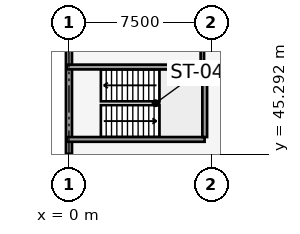
"""IFC4 building model, lengths in metres.
Left out: names, types, materials, properties, quantities, classifications, styles, units other than length and angle.
Written with IfcOpenShell. Run it as: python <this file> out.ifc"""

import sys

from ifc_helpers import new_model, si_unit, direction, frame, frame_2d, origin, place, context, subcontext, project, spatial, rectangle, extrude, element, fill, save


model = new_model("IFC4")
c1 = context("Model", 3, precision=1e-05, world=origin(), true_north=direction((0.0, 1.0)))
c2 = subcontext(c1, "Body", "Model", "MODEL_VIEW")
j1 = project(units=[si_unit("LENGTHUNIT", "METRE"), si_unit("PLANEANGLEUNIT", "RADIAN")], contexts=[c1])
p1 = place(None, origin())
s1 = spatial("IfcSite", under=j1, at=p1, CompositionType="ELEMENT")
p2 = place(p1, origin())
s2 = spatial("IfcBuilding", under=s1, at=p2, CompositionType="ELEMENT")
p3 = place(p2, frame((0.0, 0.0, 9.0)))
s3 = spatial("IfcBuildingStorey", under=s2, at=p3, CompositionType="ELEMENT", Elevation=9.0)
p4 = place(p3, frame((0.0, 45.315, 0.0), z_axis=(0.0, 0.0, 1.0), x_axis=(0.0, 1.0, 0.0)))
e1 = element("IfcWall", 1, at=p4, inside=s3, PredefinedType="SOLIDWALL", context=c2, shape_type="SweptSolid", body=[
    extrude(rectangle(XDim=6.87, YDim=0.32, at=frame_2d((3.435, 0.0))), origin(), (0.0, 0.0, 1.0), 2.87),
])
p5 = place(p3, frame((-0.12, 46.075, 0.0), z_axis=(0.0, 0.0, 1.0), x_axis=(1.0, 0.0, 0.0)))
e2 = element("IfcWall", 2, at=p5, inside=s3, PredefinedType="SOLIDWALL", context=c2, shape_type="SweptSolid", body=[
    extrude(rectangle(XDim=7.26, YDim=0.25, at=frame_2d((3.63, 0.0))), origin(), (0.0, 0.0, 1.0), 3.92),
])
p6 = place(p5, frame((0.56, 0.0, 0.0)))
e3 = element("IfcOpeningElement", 3, at=p6, cuts=e2, PredefinedType="OPENING", context=c2, shape_type="SweptSolid", body=[
    extrude(rectangle(XDim=1.1, YDim=2.15, at=frame_2d((0.55, 1.075))), frame((0.0, 0.135, 0.0), z_axis=(0.0, -1.0, 0.0), x_axis=(1.0, 0.0, 0.0)), (0.0, 0.0, 1.0), 0.27),
])
p7 = place(p3, frame((-0.12, 49.885, 0.0), z_axis=(0.0, 0.0, 1.0), x_axis=(1.0, 0.0, 0.0)))
e4 = element("IfcWall", 4, at=p7, inside=s3, PredefinedType="SOLIDWALL", context=c2, shape_type="SweptSolid", body=[
    extrude(rectangle(XDim=7.26, YDim=0.25, at=frame_2d((3.63, 0.0))), origin(), (0.0, 0.0, 1.0), 3.92),
])
p8 = place(p3, frame((7.145, 46.2, 0.0), z_axis=(0.0, 0.0, 1.0), x_axis=(0.0, 1.0, 0.0)))
e5 = element("IfcWall", 5, at=p8, inside=s3, PredefinedType="SOLIDWALL", context=c2, shape_type="SweptSolid", body=[
    extrude(rectangle(XDim=3.56, YDim=0.25, at=frame_2d((1.78, 0.0))), origin(), (0.0, 0.0, 1.0), 3.92),
])
p9 = place(p3, frame((7.02, 50.024, 0.0), z_axis=(0.0, 0.0, 1.0), x_axis=(0.0, 1.0, 0.0)))
e6 = element("IfcWall", 6, at=p9, inside=s3, PredefinedType="PARTITIONING", context=c2, shape_type="SweptSolid", body=[
    extrude(rectangle(XDim=2.364, YDim=0.18, at=frame_2d((1.182, 0.0))), origin(), (0.0, 0.0, 1.0), 2.87),
])
p10 = place(p6, origin())
e7 = element("IfcDoor", 7, at=p10, inside=s3, OperationType="SINGLE_SWING_RIGHT", PredefinedType="DOOR", context=c2, shape_type="SweptSolid", body=[
    extrude(rectangle(XDim=1.1, YDim=2.15, at=frame_2d((0.55, 1.075))), frame((0.0, 0.025, 0.0), z_axis=(0.0, -1.0, 0.0), x_axis=(1.0, 0.0, 0.0)), (0.0, 0.0, 1.0), 0.05),
])
fill(e3, e7)
save(model, sys.argv[1])
